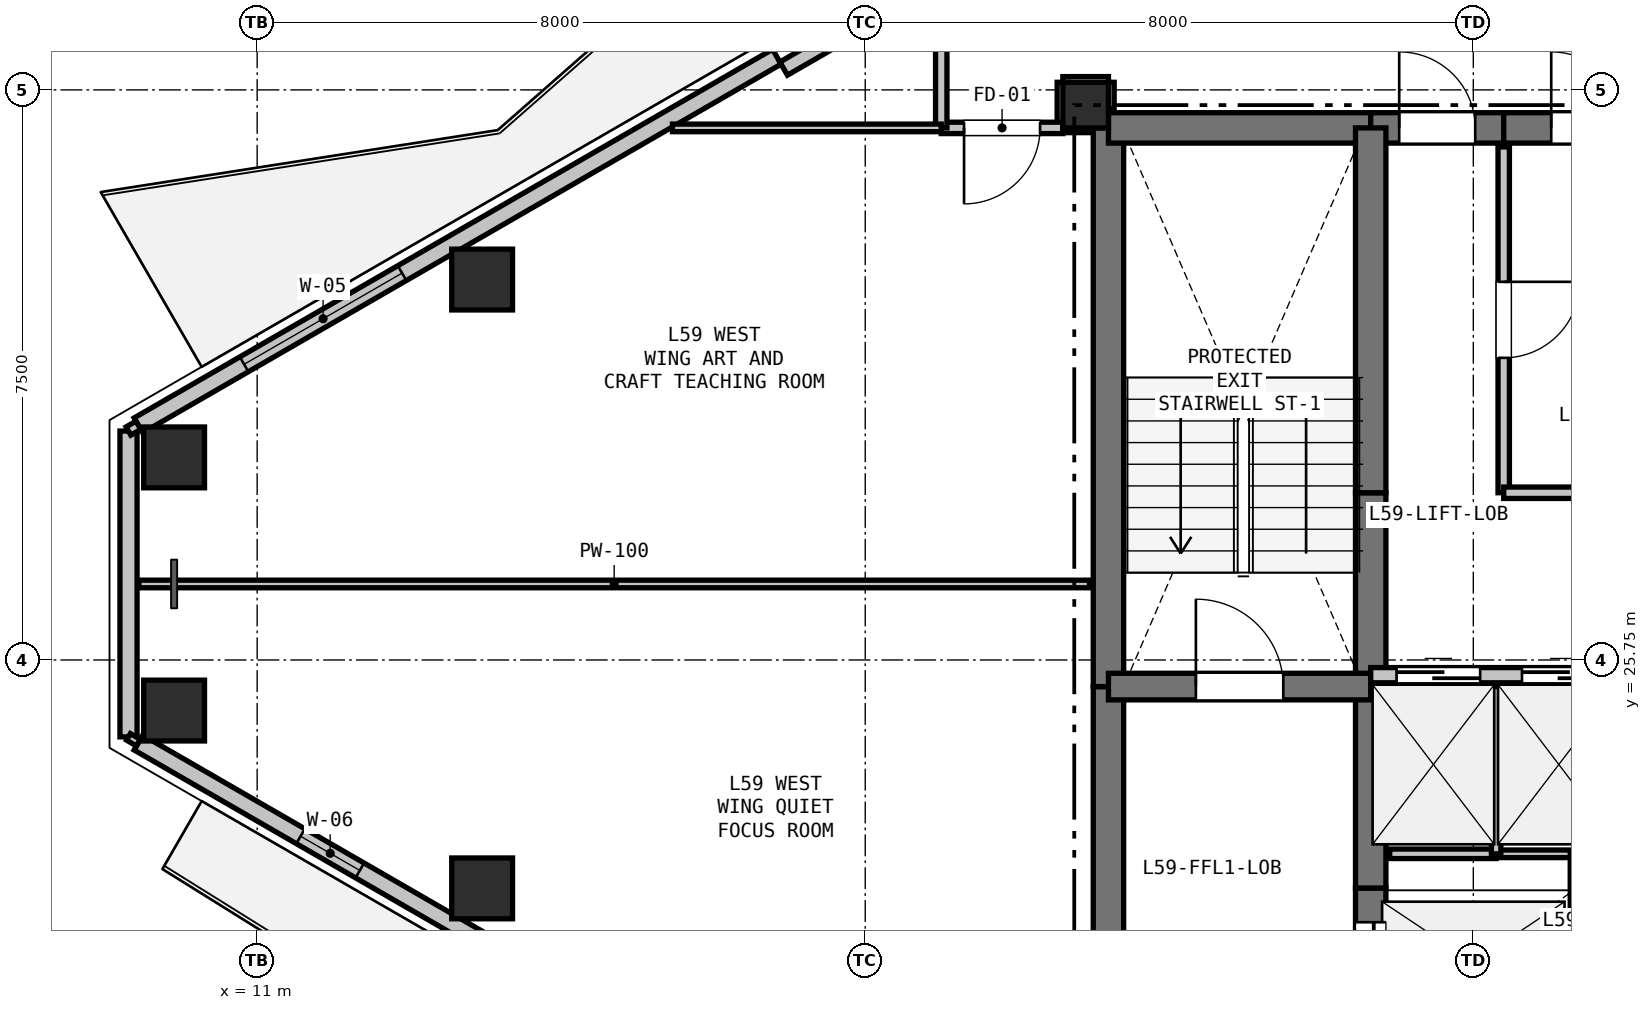
"""IFC4 building model, lengths in metres.
Left out: names, types, materials, properties, quantities, classifications, styles, units other than length and angle.
Written with IfcOpenShell. Run it as: python <this file> out.ifc"""

import sys

from ifc_helpers import new_model, si_unit, direction, frame, frame_2d, origin, origin_2d, place, context, subcontext, project, spatial, rectangle, hollow_rectangle, extrude, element, fill, save


model = new_model("IFC4")
c1 = context("Model", 3, precision=1e-05, world=origin(), true_north=direction((0.0, 1.0)))
c2 = subcontext(c1, "Body", "Model", "MODEL_VIEW")
j1 = project(units=[si_unit("LENGTHUNIT", "METRE"), si_unit("PLANEANGLEUNIT", "RADIAN")], contexts=[c1])
p1 = place(None, origin())
s1 = spatial("IfcSite", under=j1, at=p1, CompositionType="ELEMENT")
p2 = place(p1, origin())
s2 = spatial("IfcBuilding", under=s1, at=p2, CompositionType="ELEMENT")
p3 = place(p2, frame((0.0, 0.0, 211.8)))
s3 = spatial("IfcBuildingStorey", under=s2, at=p3, CompositionType="ELEMENT", Elevation=211.8)
p4 = place(p3, frame((21.9, 33.05, 0.0), z_axis=(0.0, 0.0, 1.0), x_axis=(1.0, 0.0, 0.0)))
e1 = element("IfcColumn", 1, at=p4, inside=s3, PredefinedType="COLUMN", context=c2, shape_type="SweptSolid", body=[
    extrude(rectangle(XDim=0.6, YDim=0.6, at=origin_2d()), origin(), (0.0, 0.0, 1.0), 3.3),
])
for number, where, z_axis, x_axis in (
    (2, (9.907, 28.415, 0.0), (0.0, 0.0, 1.0), (1.0, 0.0, 0.0)),
    (3, (13.96, 30.755, 0.0), (0.0, 0.0, 1.0), (1.0, 0.0, 0.0)),
    (4, (13.96, 22.745, 0.0), (0.0, 0.0, 1.0), (1.0, 0.0, 0.0)),
    (5, (9.907, 25.085, 0.0), (0.0, 0.0, 1.0), (1.0, 0.0, 0.0)),
):
    element("IfcColumn", number, at=place(p3, frame(where, z_axis=z_axis, x_axis=x_axis)), inside=s3, PredefinedType="COLUMN", context=c2, shape_type="SweptSolid", body=[
        extrude(hollow_rectangle(XDim=0.8, YDim=0.8, WallThickness=0.025, at=origin_2d()), origin(), (0.0, 0.0, 1.0), 3.3),
    ])
p5 = place(p3, frame((9.308, 24.738, 0.0), z_axis=(0.0, 0.0, 1.0), x_axis=(0.0, 1.0, 0.0)))
e6 = element("IfcWall", 6, at=p5, inside=s3, PredefinedType="SOLIDWALL", context=c2, shape_type="SweptSolid", body=[
    extrude(rectangle(XDim=4.023, YDim=0.225, at=frame_2d((2.012, 0.0))), origin(), (0.0, 0.0, 1.0), 2.69),
])
p6 = place(p3, frame((9.438, 28.837, 0.0), z_axis=(0.0, 0.0, 1.0), x_axis=(0.866027133173, 0.499997004599, 0.0)))
e7 = element("IfcWall", 7, at=p6, inside=s3, PredefinedType="SOLIDWALL", context=c2, shape_type="SweptSolid", body=[
    extrude(rectangle(XDim=9.699, YDim=0.225, at=frame_2d((4.849, 0.0))), origin(), (0.0, 0.0, 1.0), 2.69),
])
p7 = place(p6, frame((1.606, 0.0, 0.9)))
e8 = element("IfcOpeningElement", 8, at=p7, cuts=e7, PredefinedType="OPENING", context=c2, shape_type="SweptSolid", body=[
    extrude(rectangle(XDim=2.4, YDim=1.6, at=frame_2d((1.2, 0.8))), frame((0.0, 0.123, 0.0), z_axis=(0.0, -1.0, 0.0), x_axis=(1.0, 0.0, 0.0)), (0.0, 0.0, 1.0), 0.245),
])
p8 = place(p3, frame((17.927, 33.53, 0.0), z_axis=(0.0, 0.0, 1.0), x_axis=(0.86605165483, 0.499954529098, 0.0)))
e9 = element("IfcWall", 9, at=p8, inside=s3, PredefinedType="PARAPET", context=c2, shape_type="SweptSolid", body=[
    extrude(rectangle(XDim=1.7, YDim=0.2, at=frame_2d((0.85, 0.0))), origin(), (0.0, 0.0, 1.0), 2.69),
])
p9 = place(p3, frame((17.837, 19.814, 0.0), z_axis=(0.0, 0.0, 1.0), x_axis=(-0.866027133173, 0.499997004599, 0.0)))
e10 = element("IfcWall", 10, at=p9, inside=s3, PredefinedType="SOLIDWALL", context=c2, shape_type="SweptSolid", body=[
    extrude(rectangle(XDim=9.699, YDim=0.225, at=frame_2d((4.849, 0.0))), origin(), (0.0, 0.0, 1.0), 2.69),
])
p10 = place(p9, frame((6.335, 0.0, 0.9)))
e11 = element("IfcOpeningElement", 11, at=p10, cuts=e10, PredefinedType="OPENING", context=c2, shape_type="SweptSolid", body=[
    extrude(rectangle(XDim=0.9, YDim=1.4, at=frame_2d((0.45, 0.7))), frame((0.0, 0.123, 0.0), z_axis=(0.0, -1.0, 0.0), x_axis=(1.0, 0.0, 0.0)), (0.0, 0.0, 1.0), 0.245),
])
p11 = place(p3, frame((22.2, 20.75, 0.0), z_axis=(0.0, 0.0, 1.0), x_axis=(0.0, 1.0, 0.0)))
e12 = element("IfcWall", 12, at=p11, inside=s3, PredefinedType="SHEAR", context=c2, shape_type="SweptSolid", body=[
    extrude(rectangle(XDim=4.65, YDim=0.4, at=frame_2d((2.325, 0.0))), origin(), (0.0, 0.0, 1.0), 3.07),
])
p12 = place(p3, frame((22.2, 25.4, 0.0), z_axis=(0.0, 0.0, 1.0), x_axis=(0.0, 1.0, 0.0)))
e13 = element("IfcWall", 13, at=p12, inside=s3, PredefinedType="SHEAR", context=c2, shape_type="SweptSolid", body=[
    extrude(rectangle(XDim=7.35, YDim=0.4, at=frame_2d((3.675, 0.0))), origin(), (0.0, 0.0, 1.0), 3.07),
])
p13 = place(p3, frame((22.2, 32.75, 0.0), z_axis=(0.0, 0.0, 1.0), x_axis=(1.0, 0.0, 0.0)))
e14 = element("IfcWall", 14, at=p13, inside=s3, PredefinedType="SHEAR", context=c2, shape_type="SweptSolid", body=[
    extrude(rectangle(XDim=3.45, YDim=0.4, at=frame_2d((1.725, 0.0))), origin(), (0.0, 0.0, 1.0), 3.07),
])
p14 = place(p3, frame((25.65, 32.75, 0.0), z_axis=(0.0, 0.0, 1.0), x_axis=(1.0, 0.0, 0.0)))
e15 = element("IfcWall", 15, at=p14, inside=s3, PredefinedType="SHEAR", context=c2, shape_type="SweptSolid", body=[
    extrude(rectangle(XDim=1.75, YDim=0.4, at=frame_2d((0.875, 0.0))), origin(), (0.0, 0.0, 1.0), 3.07),
])
p15 = place(p14, frame((0.375, 0.0, 0.0)))
e16 = element("IfcOpeningElement", 16, at=p15, cuts=e15, PredefinedType="OPENING", context=c2, shape_type="SweptSolid", body=[
    extrude(rectangle(XDim=1.0, YDim=2.15, at=frame_2d((0.5, 1.075))), frame((0.0, 0.21, 0.0), z_axis=(0.0, -1.0, 0.0), x_axis=(1.0, 0.0, 0.0)), (0.0, 0.0, 1.0), 0.42),
])
p16 = place(p3, frame((27.4, 32.75, 0.0), z_axis=(0.0, 0.0, 1.0), x_axis=(1.0, 0.0, 0.0)))
e17 = element("IfcWall", 17, at=p16, inside=s3, PredefinedType="SHEAR", context=c2, shape_type="SweptSolid", body=[
    extrude(rectangle(XDim=2.25, YDim=0.4, at=frame_2d((1.125, 0.0))), origin(), (0.0, 0.0, 1.0), 3.07),
])
p17 = place(p16, frame((0.625, 0.0, 0.0)))
e18 = element("IfcOpeningElement", 18, at=p17, cuts=e17, PredefinedType="OPENING", context=c2, shape_type="SweptSolid", body=[
    extrude(rectangle(XDim=1.0, YDim=2.15, at=frame_2d((0.5, 1.075))), frame((0.0, 0.21, 0.0), z_axis=(0.0, -1.0, 0.0), x_axis=(1.0, 0.0, 0.0)), (0.0, 0.0, 1.0), 0.42),
])
p18 = place(p3, frame((25.65, 20.75, 0.0), z_axis=(0.0, 0.0, 1.0), x_axis=(0.0, 1.0, 0.0)))
e19 = element("IfcWall", 19, at=p18, inside=s3, PredefinedType="SHEAR", context=c2, shape_type="SweptSolid", body=[
    extrude(rectangle(XDim=2.0, YDim=0.4, at=frame_2d((1.0, 0.0))), origin(), (0.0, 0.0, 1.0), 3.07),
])
p19 = place(p18, frame((0.45, 0.0, 0.0)))
e20 = element("IfcOpeningElement", 20, at=p19, cuts=e19, PredefinedType="OPENING", context=c2, shape_type="SweptSolid", body=[
    extrude(rectangle(XDim=1.1, YDim=2.15, at=frame_2d((0.55, 1.075))), frame((0.0, 0.21, 0.0), z_axis=(0.0, -1.0, 0.0), x_axis=(1.0, 0.0, 0.0)), (0.0, 0.0, 1.0), 0.42),
])
p20 = place(p3, frame((25.65, 22.75, 0.0), z_axis=(0.0, 0.0, 1.0), x_axis=(0.0, 1.0, 0.0)))
e21 = element("IfcWall", 21, at=p20, inside=s3, PredefinedType="SHEAR", context=c2, shape_type="SweptSolid", body=[
    extrude(rectangle(XDim=2.8, YDim=0.4, at=frame_2d((1.4, 0.0))), origin(), (0.0, 0.0, 1.0), 3.07),
])
p21 = place(p3, frame((25.65, 25.55, 0.0), z_axis=(0.0, 0.0, 1.0), x_axis=(0.0, 1.0, 0.0)))
e22 = element("IfcWall", 22, at=p21, inside=s3, PredefinedType="SHEAR", context=c2, shape_type="SweptSolid", body=[
    extrude(rectangle(XDim=2.4, YDim=0.4, at=frame_2d((1.2, 0.0))), origin(), (0.0, 0.0, 1.0), 3.07),
])
p22 = place(p3, frame((25.65, 27.95, 0.0), z_axis=(0.0, 0.0, 1.0), x_axis=(0.0, 1.0, 0.0)))
e23 = element("IfcWall", 23, at=p22, inside=s3, PredefinedType="SHEAR", context=c2, shape_type="SweptSolid", body=[
    extrude(rectangle(XDim=4.8, YDim=0.4, at=frame_2d((2.4, 0.0))), origin(), (0.0, 0.0, 1.0), 3.07),
])
p23 = place(p3, frame((22.2, 25.4, 0.0), z_axis=(0.0, 0.0, 1.0), x_axis=(1.0, 0.0, 0.0)))
e24 = element("IfcWall", 24, at=p23, inside=s3, PredefinedType="SHEAR", context=c2, shape_type="SweptSolid", body=[
    extrude(rectangle(XDim=3.45, YDim=0.35, at=frame_2d((1.725, 0.0))), origin(), (0.0, 0.0, 1.0), 3.07),
])
p24 = place(p23, frame((1.15, 0.0, 0.0)))
e25 = element("IfcOpeningElement", 25, at=p24, cuts=e24, PredefinedType="OPENING", context=c2, shape_type="SweptSolid", body=[
    extrude(rectangle(XDim=1.15, YDim=2.15, at=frame_2d((0.575, 1.075))), frame((0.0, 0.185, 0.0), z_axis=(0.0, -1.0, 0.0), x_axis=(1.0, 0.0, 0.0)), (0.0, 0.0, 1.0), 0.37),
])
p25 = place(p3, frame((25.65, 25.55, 0.0), z_axis=(0.0, 0.0, 1.0), x_axis=(1.0, 0.0, 0.0)))
e26 = element("IfcWall", 26, at=p25, inside=s3, PredefinedType="PARTITIONING", context=c2, shape_type="SweptSolid", body=[
    extrude(rectangle(XDim=4.95, YDim=0.2, at=frame_2d((2.475, 0.0))), origin(), (0.0, 0.0, 1.0), 3.07),
])
p26 = place(p25, frame((0.34, 0.0, 0.0)))
e27 = element("IfcOpeningElement", 27, at=p26, cuts=e26, PredefinedType="OPENING", context=c2, shape_type="SweptSolid", body=[
    extrude(rectangle(XDim=1.1, YDim=2.15, at=frame_2d((0.55, 1.075))), frame((0.0, 0.11, 0.0), z_axis=(0.0, -1.0, 0.0), x_axis=(1.0, 0.0, 0.0)), (0.0, 0.0, 1.0), 0.22),
])
p27 = place(p25, frame((1.99, 0.0, 0.0)))
e28 = element("IfcOpeningElement", 28, at=p27, cuts=e26, PredefinedType="OPENING", context=c2, shape_type="SweptSolid", body=[
    extrude(rectangle(XDim=1.1, YDim=2.15, at=frame_2d((0.55, 1.075))), frame((0.0, 0.11, 0.0), z_axis=(0.0, -1.0, 0.0), x_axis=(1.0, 0.0, 0.0)), (0.0, 0.0, 1.0), 0.22),
])
p28 = place(p25, frame((3.64, 0.0, 0.0)))
e29 = element("IfcOpeningElement", 29, at=p28, cuts=e26, PredefinedType="OPENING", context=c2, shape_type="SweptSolid", body=[
    extrude(rectangle(XDim=1.1, YDim=2.15, at=frame_2d((0.55, 1.075))), frame((0.0, 0.11, 0.0), z_axis=(0.0, -1.0, 0.0), x_axis=(1.0, 0.0, 0.0)), (0.0, 0.0, 1.0), 0.22),
])
p29 = place(p3, frame((25.9, 23.2, 0.0), z_axis=(0.0, 0.0, 1.0), x_axis=(1.0, 0.0, 0.0)))
e30 = element("IfcWall", 30, at=p29, inside=s3, PredefinedType="PARTITIONING", context=c2, shape_type="SweptSolid", body=[
    extrude(rectangle(XDim=1.4, YDim=0.125, at=frame_2d((0.7, 0.0))), origin(), (0.0, 0.0, 1.0), 3.07),
])
p30 = place(p3, frame((27.3, 23.2, 0.0), z_axis=(0.0, 0.0, 1.0), x_axis=(1.0, 0.0, 0.0)))
e31 = element("IfcWall", 31, at=p30, inside=s3, PredefinedType="PARTITIONING", context=c2, shape_type="SweptSolid", body=[
    extrude(rectangle(XDim=1.05, YDim=0.1, at=frame_2d((0.525, 0.0))), origin(), (0.0, 0.0, 1.0), 3.07),
])
p31 = place(p3, frame((28.35, 23.2, 0.0), z_axis=(0.0, 0.0, 1.0), x_axis=(0.0, -1.0, 0.0)))
e32 = element("IfcWall", 32, at=p31, inside=s3, PredefinedType="PARTITIONING", context=c2, shape_type="SweptSolid", body=[
    extrude(rectangle(XDim=2.2, YDim=0.15, at=frame_2d((1.1, 0.0))), origin(), (0.0, 0.0, 1.0), 3.07),
])
p32 = place(p3, frame((27.3, 25.4, 0.0), z_axis=(0.0, 0.0, 1.0), x_axis=(0.0, -1.0, 0.0)))
e33 = element("IfcWall", 33, at=p32, inside=s3, PredefinedType="PARTITIONING", context=c2, shape_type="SweptSolid", body=[
    extrude(rectangle(XDim=2.2, YDim=0.125, at=frame_2d((1.1, 0.0))), origin(), (0.0, 0.0, 1.0), 3.07),
])
p33 = place(p3, frame((27.4, 32.5, 0.0), z_axis=(0.0, 0.0, 1.0), x_axis=(0.0, -1.0, 0.0)))
e34 = element("IfcWall", 34, at=p33, inside=s3, PredefinedType="PARTITIONING", context=c2, shape_type="SweptSolid", body=[
    extrude(rectangle(XDim=4.55, YDim=0.15, at=frame_2d((2.275, 0.0))), origin(), (0.0, 0.0, 1.0), 3.07),
])
p34 = place(p33, frame((1.775, 0.0, 0.0)))
e35 = element("IfcOpeningElement", 35, at=p34, cuts=e34, PredefinedType="OPENING", context=c2, shape_type="SweptSolid", body=[
    extrude(rectangle(XDim=1.0, YDim=2.15, at=frame_2d((0.5, 1.075))), frame((0.0, 0.085, 0.0), z_axis=(0.0, -1.0, 0.0), x_axis=(1.0, 0.0, 0.0)), (0.0, 0.0, 1.0), 0.17),
])
p35 = place(p3, frame((27.4, 27.95, 0.0), z_axis=(0.0, 0.0, 1.0), x_axis=(1.0, 0.0, 0.0)))
e36 = element("IfcWall", 36, at=p35, inside=s3, PredefinedType="PARTITIONING", context=c2, shape_type="SweptSolid", body=[
    extrude(rectangle(XDim=2.45, YDim=0.15, at=frame_2d((1.225, 0.0))), origin(), (0.0, 0.0, 1.0), 3.07),
])
p36 = place(p3, frame((22.2, 33.0, 0.0), z_axis=(0.0, 0.0, 1.0), x_axis=(0.0, 1.0, 0.0)))
e37 = element("IfcWall", 37, at=p36, inside=s3, PredefinedType="PARTITIONING", context=c2, shape_type="SweptSolid", body=[
    extrude(rectangle(XDim=0.35, YDim=0.15, at=frame_2d((0.175, 0.0))), origin(), (0.0, 0.0, 1.0), 2.595),
])
p37 = place(p3, frame((22.2, 33.35, 0.0), z_axis=(0.0, 0.0, 1.0), x_axis=(-1.0, 0.0, 0.0)))
e38 = element("IfcWall", 38, at=p37, inside=s3, PredefinedType="PARTITIONING", context=c2, shape_type="SweptSolid", body=[
    extrude(rectangle(XDim=0.6, YDim=0.15, at=frame_2d((0.3, 0.0))), origin(), (0.0, 0.0, 1.0), 3.07),
])
p38 = place(p3, frame((21.6, 33.35, 0.0), z_axis=(0.0, 0.0, 1.0), x_axis=(0.0, -1.0, 0.0)))
e39 = element("IfcWall", 39, at=p38, inside=s3, PredefinedType="PARTITIONING", context=c2, shape_type="SweptSolid", body=[
    extrude(rectangle(XDim=0.6, YDim=0.15, at=frame_2d((0.3, 0.0))), origin(), (0.0, 0.0, 1.0), 2.518),
])
p39 = place(p3, frame((21.6, 32.75, 0.0), z_axis=(0.0, 0.0, 1.0), x_axis=(-1.0, 0.0, 0.0)))
e40 = element("IfcWall", 40, at=p39, inside=s3, PredefinedType="PARTITIONING", context=c2, shape_type="SweptSolid", body=[
    extrude(rectangle(XDim=1.6, YDim=0.15, at=frame_2d((0.8, 0.0))), origin(), (0.0, 0.0, 1.0), 2.518),
])
p40 = place(p39, frame((0.3, 0.0, 0.0)))
e41 = element("IfcOpeningElement", 41, at=p40, cuts=e40, PredefinedType="OPENING", context=c2, shape_type="SweptSolid", body=[
    extrude(rectangle(XDim=1.0, YDim=2.15, at=frame_2d((0.5, 1.075))), frame((0.0, 0.085, 0.0), z_axis=(0.0, -1.0, 0.0), x_axis=(1.0, 0.0, 0.0)), (0.0, 0.0, 1.0), 0.17),
])
p41 = place(p3, frame((20.0, 32.75, 0.0), z_axis=(0.0, 0.0, 1.0), x_axis=(0.0, 1.0, 0.0)))
e42 = element("IfcWall", 42, at=p41, inside=s3, PredefinedType="PARTITIONING", context=c2, shape_type="SweptSolid", body=[
    extrude(rectangle(XDim=2.141, YDim=0.15, at=frame_2d((1.071, 0.0))), origin(), (0.0, 0.0, 1.0), 2.365),
])
p42 = place(p3, frame((16.464, 32.75, 0.0), z_axis=(0.0, 0.0, 1.0), x_axis=(1.0, 0.0, 0.0)))
e43 = element("IfcWall", 43, at=p42, inside=s3, PredefinedType="PARTITIONING", context=c2, shape_type="SweptSolid", body=[
    extrude(rectangle(XDim=3.536, YDim=0.1, at=frame_2d((1.768, 0.0))), origin(), (0.0, 0.0, 1.0), 2.365),
])
p43 = place(p3, frame((21.6, 32.75, 0.0), z_axis=(0.0, 0.0, 1.0), x_axis=(1.0, 0.0, 0.0)))
e44 = element("IfcWall", 44, at=p43, inside=s3, PredefinedType="PARTITIONING", context=c2, shape_type="SweptSolid", body=[
    extrude(rectangle(XDim=0.35, YDim=0.125, at=frame_2d((0.175, 0.0))), origin(), (0.0, 0.0, 1.0), 2.595),
])
p44 = place(p3, frame((21.95, 26.75, 0.0), z_axis=(0.0, 0.0, 1.0), x_axis=(-1.0, 0.0, 0.0)))
e45 = element("IfcWall", 45, at=p44, inside=s3, PredefinedType="PARTITIONING", context=c2, shape_type="SweptSolid", body=[
    extrude(rectangle(XDim=12.506, YDim=0.1, at=frame_2d((6.253, 0.0))), origin(), (0.0, 0.0, 1.0), 2.595),
])
p45 = place(p3, frame((9.307, 28.762, 0.0), z_axis=(0.0, 0.0, 1.0), x_axis=(0.865833797362, 0.500331725305, 0.0)))
e46 = element("IfcWall", 46, at=p45, inside=s3, PredefinedType="PARTITIONING", context=c2, shape_type="SweptSolid", body=[
    extrude(rectangle(XDim=0.15, YDim=0.125, at=frame_2d((0.075, 0.0))), origin(), (0.0, 0.0, 1.0), 3.07),
])
p46 = place(p3, frame((9.437, 24.663, 0.0), z_axis=(0.0, 0.0, 1.0), x_axis=(-0.865833797362, 0.500331725305, 0.0)))
e47 = element("IfcWall", 47, at=p46, inside=s3, PredefinedType="PARTITIONING", context=c2, shape_type="SweptSolid", body=[
    extrude(rectangle(XDim=0.15, YDim=0.1, at=frame_2d((0.075, 0.0))), origin(), (0.0, 0.0, 1.0), 3.07),
])
p47 = place(p7, origin())
e48 = element("IfcWindow", 48, at=p47, inside=s3, PartitioningType="SINGLE_PANEL", PredefinedType="WINDOW", context=c2, shape_type="SweptSolid", body=[
    extrude(rectangle(XDim=2.4, YDim=1.6, at=frame_2d((1.2, 0.8))), frame((0.0, 0.03, 0.0), z_axis=(0.0, -1.0, 0.0), x_axis=(1.0, 0.0, 0.0)), (0.0, 0.0, 1.0), 0.06),
])
fill(e8, e48)
p48 = place(p10, origin())
e49 = element("IfcWindow", 49, at=p48, inside=s3, PartitioningType="SINGLE_PANEL", PredefinedType="WINDOW", context=c2, shape_type="SweptSolid", body=[
    extrude(rectangle(XDim=0.9, YDim=1.4, at=frame_2d((0.45, 0.7))), frame((0.0, 0.03, 0.0), z_axis=(0.0, -1.0, 0.0), x_axis=(1.0, 0.0, 0.0)), (0.0, 0.0, 1.0), 0.06),
])
fill(e11, e49)
p49 = place(p26, origin())
e50 = element("IfcDoor", 50, at=p49, inside=s3, OperationType="SLIDING_TO_LEFT", PredefinedType="DOOR", context=c2, shape_type="SweptSolid", body=[
    extrude(rectangle(XDim=1.1, YDim=2.15, at=frame_2d((0.55, 1.075))), frame((0.0, 0.025, 0.0), z_axis=(0.0, -1.0, 0.0), x_axis=(1.0, 0.0, 0.0)), (0.0, 0.0, 1.0), 0.05),
])
fill(e27, e50)
p50 = place(p27, origin())
e51 = element("IfcDoor", 51, at=p50, inside=s3, OperationType="SLIDING_TO_LEFT", PredefinedType="DOOR", context=c2, shape_type="SweptSolid", body=[
    extrude(rectangle(XDim=1.1, YDim=2.15, at=frame_2d((0.55, 1.075))), frame((0.0, 0.025, 0.0), z_axis=(0.0, -1.0, 0.0), x_axis=(1.0, 0.0, 0.0)), (0.0, 0.0, 1.0), 0.05),
])
fill(e28, e51)
p51 = place(p15, origin())
e52 = element("IfcDoor", 52, at=p51, inside=s3, OperationType="SINGLE_SWING_LEFT", PredefinedType="DOOR", context=c2, shape_type="SweptSolid", body=[
    extrude(rectangle(XDim=1.0, YDim=2.15, at=frame_2d((0.5, 1.075))), frame((0.0, 0.025, 0.0), z_axis=(0.0, -1.0, 0.0), x_axis=(1.0, 0.0, 0.0)), (0.0, 0.0, 1.0), 0.05),
])
fill(e16, e52)
p52 = place(p19, origin())
e53 = element("IfcDoor", 53, at=p52, inside=s3, OperationType="SLIDING_TO_LEFT", PredefinedType="DOOR", context=c2, shape_type="SweptSolid", body=[
    extrude(rectangle(XDim=1.1, YDim=2.15, at=frame_2d((0.55, 1.075))), frame((0.0, 0.025, 0.0), z_axis=(0.0, -1.0, 0.0), x_axis=(1.0, 0.0, 0.0)), (0.0, 0.0, 1.0), 0.05),
])
fill(e20, e53)
p53 = place(p24, origin())
e54 = element("IfcDoor", 54, at=p53, inside=s3, OperationType="SINGLE_SWING_LEFT", PredefinedType="DOOR", context=c2, shape_type="SweptSolid", body=[
    extrude(rectangle(XDim=1.15, YDim=2.15, at=frame_2d((0.575, 1.075))), frame((0.0, 0.025, 0.0), z_axis=(0.0, -1.0, 0.0), x_axis=(1.0, 0.0, 0.0)), (0.0, 0.0, 1.0), 0.05),
])
fill(e25, e54)
p54 = place(p34, origin())
e55 = element("IfcDoor", 55, at=p54, inside=s3, OperationType="SINGLE_SWING_LEFT", PredefinedType="DOOR", context=c2, shape_type="SweptSolid", body=[
    extrude(rectangle(XDim=1.0, YDim=2.15, at=frame_2d((0.5, 1.075))), frame((0.0, 0.025, 0.0), z_axis=(0.0, -1.0, 0.0), x_axis=(1.0, 0.0, 0.0)), (0.0, 0.0, 1.0), 0.05),
])
fill(e35, e55)
p55 = place(p17, origin())
e56 = element("IfcDoor", 56, at=p55, inside=s3, OperationType="SINGLE_SWING_LEFT", PredefinedType="DOOR", context=c2, shape_type="SweptSolid", body=[
    extrude(rectangle(XDim=1.0, YDim=2.15, at=frame_2d((0.5, 1.075))), frame((0.0, 0.025, 0.0), z_axis=(0.0, -1.0, 0.0), x_axis=(1.0, 0.0, 0.0)), (0.0, 0.0, 1.0), 0.05),
])
fill(e18, e56)
p56 = place(p40, origin())
e57 = element("IfcDoor", 57, at=p56, inside=s3, OperationType="SINGLE_SWING_RIGHT", PredefinedType="DOOR", context=c2, shape_type="SweptSolid", body=[
    extrude(rectangle(XDim=1.0, YDim=2.15, at=frame_2d((0.5, 1.075))), frame((0.0, 0.025, 0.0), z_axis=(0.0, -1.0, 0.0), x_axis=(1.0, 0.0, 0.0)), (0.0, 0.0, 1.0), 0.05),
])
fill(e41, e57)
save(model, sys.argv[1])
